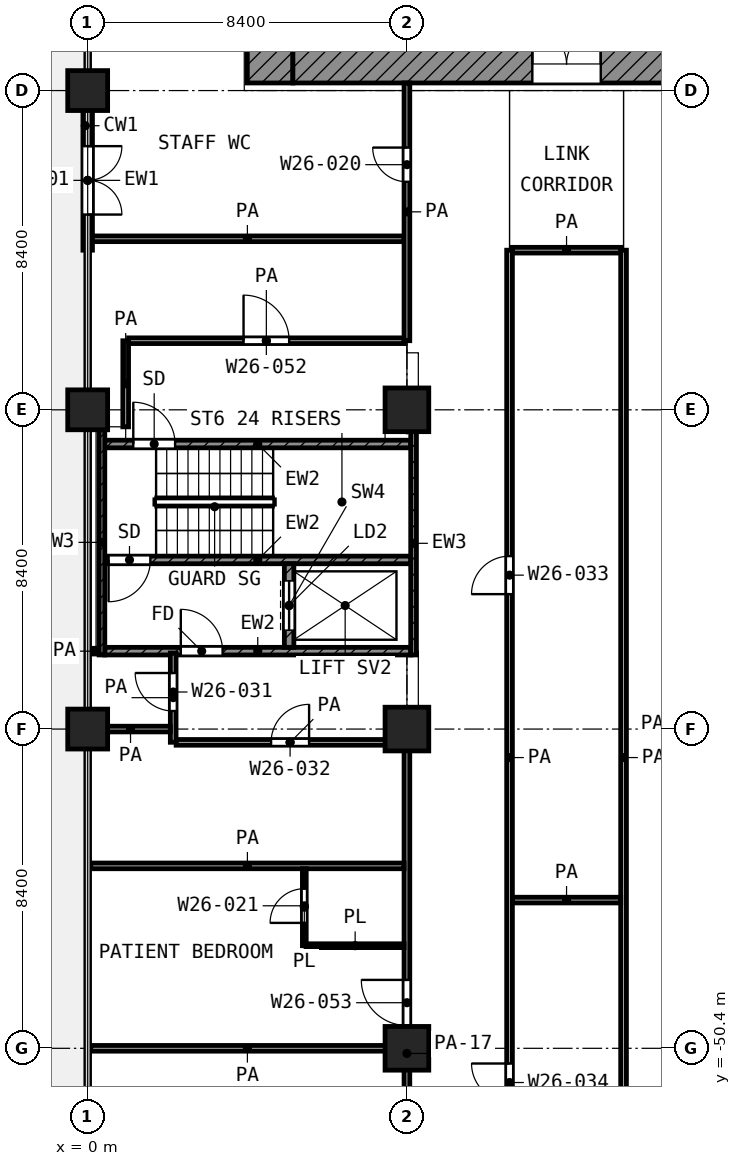
"""IFC4 building model, lengths in metres.
Left out: names, types, materials, properties, quantities, classifications, styles, units other than length and angle.
Written with IfcOpenShell. Run it as: python <this file> out.ifc"""

import sys

from ifc_helpers import new_model, si_unit, direction, frame, frame_2d, origin, origin_2d, place, context, subcontext, project, spatial, rectangle, extrude, element, fill, save


model = new_model("IFC4")
c1 = context("Model", 3, precision=1e-05, world=origin(), true_north=direction((0.0, 1.0)))
c2 = subcontext(c1, "Body", "Model", "MODEL_VIEW")
j1 = project(units=[si_unit("LENGTHUNIT", "METRE"), si_unit("PLANEANGLEUNIT", "RADIAN")], contexts=[c1])
p1 = place(None, origin())
s1 = spatial("IfcSite", under=j1, at=p1, CompositionType="ELEMENT")
p2 = place(p1, origin())
s2 = spatial("IfcBuilding", under=s1, at=p2, CompositionType="ELEMENT")
p3 = place(p2, frame((0.0, 0.0, 115.6)))
s3 = spatial("IfcBuildingStorey", under=s2, at=p3, CompositionType="ELEMENT", Elevation=115.6)
for number, where, z_axis, x_axis in (
    (1, (0.0, -25.2, 0.0), (0.0, 0.0, 1.0), (1.0, 0.0, 0.0)),
    (2, (0.0, -33.6, 0.0), (0.0, 0.0, 1.0), (1.0, 0.0, 0.0)),
):
    element("IfcColumn", number, at=place(p3, frame(where, z_axis=z_axis, x_axis=x_axis)), inside=s3, PredefinedType="COLUMN", context=c2, shape_type="SweptSolid", body=[
        extrude(rectangle(XDim=1.05, YDim=1.05, at=origin_2d()), origin(), (0.0, 0.0, 1.0), 4.2),
    ])
p4 = place(p3, frame((8.4, -33.6, 0.0), z_axis=(0.0, 0.0, 1.0), x_axis=(1.0, 0.0, 0.0)))
e3 = element("IfcColumn", 3, at=p4, inside=s3, PredefinedType="COLUMN", context=c2, shape_type="SweptSolid", body=[
    extrude(rectangle(XDim=1.15, YDim=1.15, at=origin_2d()), origin(), (0.0, 0.0, 1.0), 4.2),
])
p5 = place(p3, frame((0.0, -42.0, 0.0), z_axis=(0.0, 0.0, 1.0), x_axis=(1.0, 0.0, 0.0)))
e4 = element("IfcColumn", 4, at=p5, inside=s3, PredefinedType="COLUMN", context=c2, shape_type="SweptSolid", body=[
    extrude(rectangle(XDim=1.05, YDim=1.05, at=origin_2d()), origin(), (0.0, 0.0, 1.0), 4.2),
])
for number, where, z_axis, x_axis in (
    (5, (8.4, -42.0, 0.0), (0.0, 0.0, 1.0), (1.0, 0.0, 0.0)),
    (6, (8.4, -50.4, 0.0), (0.0, 0.0, 1.0), (1.0, 0.0, 0.0)),
):
    element("IfcColumn", number, at=place(p3, frame(where, z_axis=z_axis, x_axis=x_axis)), inside=s3, PredefinedType="COLUMN", context=c2, shape_type="SweptSolid", body=[
        extrude(rectangle(XDim=1.15, YDim=1.15, at=origin_2d()), origin(), (0.0, 0.0, 1.0), 4.2),
    ])
p6 = place(p3, frame((0.0, -25.725, 0.0), z_axis=(0.0, 0.0, 1.0), x_axis=(0.0, -1.0, 0.0)))
e7 = element("IfcWall", 7, at=p6, inside=s3, PredefinedType="SOLIDWALL", context=c2, shape_type="SweptSolid", body=[
    extrude(rectangle(XDim=3.675, YDim=0.25, at=frame_2d((1.837, 0.0))), origin(), (0.0, 0.0, 1.0), 3.48),
])
p7 = place(p6, frame((0.938, 0.0, 0.0)))
e8 = element("IfcOpeningElement", 8, at=p7, cuts=e7, PredefinedType="OPENING", context=c2, shape_type="SweptSolid", body=[
    extrude(rectangle(XDim=1.8, YDim=2.1, at=frame_2d((0.9, 1.05))), frame((0.0, 0.135, 0.0), z_axis=(0.0, -1.0, 0.0), x_axis=(1.0, 0.0, 0.0)), (0.0, 0.0, 1.0), 0.27),
])
p8 = place(p3, frame((4.8, -25.0, 0.0), z_axis=(0.0, 0.0, 1.0), x_axis=(0.0, 1.0, 0.0)))
e9 = element("IfcWall", 9, at=p8, inside=s3, PredefinedType="SHEAR", context=c2, shape_type="SweptSolid", body=[
    extrude(rectangle(XDim=19.6, YDim=1.2, at=frame_2d((9.8, 0.0))), origin(), (0.0, 0.0, 1.0), 3.6),
])
p9 = place(p8, frame((11.45, 0.0, 0.0)))
e10 = element("IfcOpeningElement", 10, at=p9, cuts=e9, PredefinedType="OPENING", context=c2, shape_type="SweptSolid", body=[
    extrude(rectangle(XDim=1.1, YDim=2.1, at=frame_2d((0.55, 1.05))), frame((0.0, 0.61, 0.0), z_axis=(0.0, -1.0, 0.0), x_axis=(1.0, 0.0, 0.0)), (0.0, 0.0, 1.0), 1.22),
])
p10 = place(p8, frame((2.15, 0.0, 0.0)))
e11 = element("IfcOpeningElement", 11, at=p10, cuts=e9, PredefinedType="OPENING", context=c2, shape_type="SweptSolid", body=[
    extrude(rectangle(XDim=1.1, YDim=2.1, at=frame_2d((0.55, 1.05))), frame((0.0, 0.61, 0.0), z_axis=(0.0, -1.0, 0.0), x_axis=(1.0, 0.0, 0.0)), (0.0, 0.0, 1.0), 1.22),
])
p11 = place(p3, frame((5.4, -24.5, 0.0), z_axis=(0.0, 0.0, 1.0), x_axis=(1.0, 0.0, 0.0)))
e12 = element("IfcWall", 12, at=p11, inside=s3, PredefinedType="SHEAR", context=c2, shape_type="SweptSolid", body=[
    extrude(rectangle(XDim=18.6, YDim=1.0, at=frame_2d((9.3, 0.0))), origin(), (0.0, 0.0, 1.0), 3.6),
])
p12 = place(p11, frame((6.3, 0.0, 0.0)))
e13 = element("IfcOpeningElement", 13, at=p12, cuts=e12, PredefinedType="OPENING", context=c2, shape_type="SweptSolid", body=[
    extrude(rectangle(XDim=1.8, YDim=2.1, at=frame_2d((0.9, 1.05))), frame((0.0, 0.51, 0.0), z_axis=(0.0, -1.0, 0.0), x_axis=(1.0, 0.0, 0.0)), (0.0, 0.0, 1.0), 1.02),
])
p13 = place(p3, frame((0.375, -40.05, 0.0), z_axis=(0.0, 0.0, 1.0), x_axis=(0.0, 1.0, 0.0)))
e14 = element("IfcWall", 14, at=p13, inside=s3, PredefinedType="SHEAR", context=c2, shape_type="SweptSolid", body=[
    extrude(rectangle(XDim=5.925, YDim=0.15, at=frame_2d((2.962, 0.0))), origin(), (0.0, 0.0, 1.0), 3.6),
])
p14 = place(p3, frame((8.575, -40.05, 0.0), z_axis=(0.0, 0.0, 1.0), x_axis=(0.0, 1.0, 0.0)))
e15 = element("IfcWall", 15, at=p14, inside=s3, PredefinedType="SHEAR", context=c2, shape_type="SweptSolid", body=[
    extrude(rectangle(XDim=5.875, YDim=0.15, at=frame_2d((2.938, 0.0))), origin(), (0.0, 0.0, 1.0), 3.6),
])
p15 = place(p3, frame((0.45, -34.5, 0.0), z_axis=(0.0, 0.0, 1.0), x_axis=(1.0, 0.0, 0.0)))
e16 = element("IfcWall", 16, at=p15, inside=s3, PredefinedType="SHEAR", context=c2, shape_type="SweptSolid", body=[
    extrude(rectangle(XDim=8.05, YDim=0.2, at=frame_2d((4.025, 0.0))), origin(), (0.0, 0.0, 1.0), 3.6),
])
p16 = place(p15, frame((0.75, 0.0, 0.0)))
e17 = element("IfcOpeningElement", 17, at=p16, cuts=e16, PredefinedType="OPENING", context=c2, shape_type="SweptSolid", body=[
    extrude(rectangle(XDim=1.1, YDim=2.1, at=frame_2d((0.55, 1.05))), frame((0.0, 0.11, 0.0), z_axis=(0.0, -1.0, 0.0), x_axis=(1.0, 0.0, 0.0)), (0.0, 0.0, 1.0), 0.22),
])
p17 = place(p3, frame((0.45, -37.55, 0.0), z_axis=(0.0, 0.0, 1.0), x_axis=(1.0, 0.0, 0.0)))
e18 = element("IfcWall", 18, at=p17, inside=s3, PredefinedType="SHEAR", context=c2, shape_type="SweptSolid", body=[
    extrude(rectangle(XDim=8.05, YDim=0.2, at=frame_2d((4.025, 0.0))), origin(), (0.0, 0.0, 1.0), 3.6),
])
p18 = place(p17, frame((0.1, 0.0, 0.0)))
e19 = element("IfcOpeningElement", 19, at=p18, cuts=e18, PredefinedType="OPENING", context=c2, shape_type="SweptSolid", body=[
    extrude(rectangle(XDim=1.1, YDim=2.1, at=frame_2d((0.55, 1.05))), frame((0.0, 0.11, 0.0), z_axis=(0.0, -1.0, 0.0), x_axis=(1.0, 0.0, 0.0)), (0.0, 0.0, 1.0), 0.22),
])
p19 = place(p3, frame((0.45, -39.95, 0.0), z_axis=(0.0, 0.0, 1.0), x_axis=(1.0, 0.0, 0.0)))
e20 = element("IfcWall", 20, at=p19, inside=s3, PredefinedType="SHEAR", context=c2, shape_type="SweptSolid", body=[
    extrude(rectangle(XDim=8.05, YDim=0.2, at=frame_2d((4.025, 0.0))), origin(), (0.0, 0.0, 1.0), 3.6),
])
p20 = place(p19, frame((2.0, 0.0, 0.0)))
e21 = element("IfcOpeningElement", 21, at=p20, cuts=e20, PredefinedType="OPENING", context=c2, shape_type="SweptSolid", body=[
    extrude(rectangle(XDim=1.1, YDim=2.1, at=frame_2d((0.55, 1.05))), frame((0.0, 0.11, 0.0), z_axis=(0.0, -1.0, 0.0), x_axis=(1.0, 0.0, 0.0)), (0.0, 0.0, 1.0), 0.22),
])
p21 = place(p3, frame((5.3, -39.85, 0.0), z_axis=(0.0, 0.0, 1.0), x_axis=(0.0, 1.0, 0.0)))
e22 = element("IfcWall", 22, at=p21, inside=s3, PredefinedType="SHEAR", context=c2, shape_type="SweptSolid", body=[
    extrude(rectangle(XDim=2.2, YDim=0.25, at=frame_2d((1.1, 0.0))), origin(), (0.0, 0.0, 1.0), 3.6),
])
p22 = place(p21, frame((0.45, 0.0, 0.0)))
e23 = element("IfcOpeningElement", 23, at=p22, cuts=e22, PredefinedType="OPENING", context=c2, shape_type="SweptSolid", body=[
    extrude(rectangle(XDim=1.3, YDim=2.1, at=frame_2d((0.65, 1.05))), frame((0.0, 0.135, 0.0), z_axis=(0.0, -1.0, 0.0), x_axis=(1.0, 0.0, 0.0)), (0.0, 0.0, 1.0), 0.27),
])
p23 = place(p3, frame((5.75, -47.7, 0.0), z_axis=(0.0, 0.0, 1.0), x_axis=(1.0, 0.0, 0.0)))
e24 = element("IfcWall", 24, at=p23, inside=s3, PredefinedType="PARTITIONING", context=c2, shape_type="SweptSolid", body=[
    extrude(rectangle(XDim=2.575, YDim=0.1, at=frame_2d((1.288, 0.0))), origin(), (0.0, 0.0, 1.0), 3.6),
])
p24 = place(p3, frame((5.7, -47.7, 0.0), z_axis=(0.0, 0.0, 1.0), x_axis=(0.0, 1.0, 0.0)))
e25 = element("IfcWall", 25, at=p24, inside=s3, PredefinedType="PARTITIONING", context=c2, shape_type="SweptSolid", body=[
    extrude(rectangle(XDim=2.025, YDim=0.1, at=frame_2d((1.012, 0.0))), origin(), (0.0, 0.0, 1.0), 3.6),
])
p25 = place(p24, frame((0.6, 0.0, 0.0)))
e26 = element("IfcOpeningElement", 26, at=p25, cuts=e25, PredefinedType="OPENING", context=c2, shape_type="SweptSolid", body=[
    extrude(rectangle(XDim=0.9, YDim=2.1, at=frame_2d((0.45, 1.05))), frame((0.0, 0.06, 0.0), z_axis=(0.0, -1.0, 0.0), x_axis=(1.0, 0.0, 0.0)), (0.0, 0.0, 1.0), 0.12),
])
p26 = place(p3, frame((0.08, -50.4, 0.0), z_axis=(0.0, 0.0, 1.0), x_axis=(1.0, 0.0, 0.0)))
e27 = element("IfcWall", 27, at=p26, inside=s3, PredefinedType="PARTITIONING", context=c2, shape_type="SweptSolid", body=[
    extrude(rectangle(XDim=8.245, YDim=0.15, at=frame_2d((4.123, 0.0))), origin(), (0.0, 0.0, 1.0), 3.6),
])
p27 = place(p3, frame((11.175, -46.5, 0.0), z_axis=(0.0, 0.0, 1.0), x_axis=(1.0, 0.0, 0.0)))
e28 = element("IfcWall", 28, at=p27, inside=s3, PredefinedType="PARTITIONING", context=c2, shape_type="SweptSolid", body=[
    extrude(rectangle(XDim=2.85, YDim=0.15, at=frame_2d((1.425, 0.0))), origin(), (0.0, 0.0, 1.0), 3.6),
])
p28 = place(p3, frame((0.08, -45.6, 0.0), z_axis=(0.0, 0.0, 1.0), x_axis=(1.0, 0.0, 0.0)))
e29 = element("IfcWall", 29, at=p28, inside=s3, PredefinedType="PARTITIONING", context=c2, shape_type="SweptSolid", body=[
    extrude(rectangle(XDim=8.245, YDim=0.15, at=frame_2d((4.123, 0.0))), origin(), (0.0, 0.0, 1.0), 3.6),
])
p29 = place(p3, frame((2.327, -42.35, 0.0), z_axis=(0.0, 0.0, 1.0), x_axis=(1.0, 0.0, 0.0)))
e30 = element("IfcWall", 30, at=p29, inside=s3, PredefinedType="PARTITIONING", context=c2, shape_type="SweptSolid", body=[
    extrude(rectangle(XDim=5.998, YDim=0.15, at=frame_2d((2.999, 0.0))), origin(), (0.0, 0.0, 1.0), 3.6),
])
p30 = place(p29, frame((2.499, 0.0, 0.0)))
e31 = element("IfcOpeningElement", 31, at=p30, cuts=e30, PredefinedType="OPENING", context=c2, shape_type="SweptSolid", body=[
    extrude(rectangle(XDim=1.0, YDim=2.1, at=frame_2d((0.5, 1.05))), frame((0.0, 0.085, 0.0), z_axis=(0.0, -1.0, 0.0), x_axis=(1.0, 0.0, 0.0)), (0.0, 0.0, 1.0), 0.17),
])
p31 = place(p3, frame((0.08, -42.0, 0.0), z_axis=(0.0, 0.0, 1.0), x_axis=(1.0, 0.0, 0.0)))
e32 = element("IfcWall", 32, at=p31, inside=s3, PredefinedType="PARTITIONING", context=c2, shape_type="SweptSolid", body=[
    extrude(rectangle(XDim=2.095, YDim=0.15, at=frame_2d((1.047, 0.0))), origin(), (0.0, 0.0, 1.0), 3.6),
])
p32 = place(p3, frame((0.08, -39.95, 0.0), z_axis=(0.0, 0.0, 1.0), x_axis=(1.0, 0.0, 0.0)))
e33 = element("IfcWall", 33, at=p32, inside=s3, PredefinedType="PARTITIONING", context=c2, shape_type="SweptSolid", body=[
    extrude(rectangle(XDim=0.19, YDim=0.15, at=frame_2d((0.095, 0.0))), origin(), (0.0, 0.0, 1.0), 3.6),
])
p33 = place(p3, frame((1.077, -31.782, 0.0), z_axis=(0.0, 0.0, 1.0), x_axis=(1.0, 0.0, 0.0)))
e34 = element("IfcWall", 34, at=p33, inside=s3, PredefinedType="PARTITIONING", context=c2, shape_type="SweptSolid", body=[
    extrude(rectangle(XDim=7.248, YDim=0.15, at=frame_2d((3.624, 0.0))), origin(), (0.0, 0.0, 1.0), 3.6),
])
p34 = place(p33, frame((3.024, 0.0, 0.0)))
e35 = element("IfcOpeningElement", 35, at=p34, cuts=e34, PredefinedType="OPENING", context=c2, shape_type="SweptSolid", body=[
    extrude(rectangle(XDim=1.2, YDim=2.1, at=frame_2d((0.6, 1.05))), frame((0.0, 0.085, 0.0), z_axis=(0.0, -1.0, 0.0), x_axis=(1.0, 0.0, 0.0)), (0.0, 0.0, 1.0), 0.17),
])
p35 = place(p3, frame((11.175, -29.4, 0.0), z_axis=(0.0, 0.0, 1.0), x_axis=(1.0, 0.0, 0.0)))
e36 = element("IfcWall", 36, at=p35, inside=s3, PredefinedType="PARTITIONING", context=c2, shape_type="SweptSolid", body=[
    extrude(rectangle(XDim=2.85, YDim=0.15, at=frame_2d((1.425, 0.0))), origin(), (0.0, 0.0, 1.0), 3.6),
])
p36 = place(p3, frame((0.08, -29.1, 0.0), z_axis=(0.0, 0.0, 1.0), x_axis=(1.0, 0.0, 0.0)))
e37 = element("IfcWall", 37, at=p36, inside=s3, PredefinedType="PARTITIONING", context=c2, shape_type="SweptSolid", body=[
    extrude(rectangle(XDim=8.245, YDim=0.15, at=frame_2d((4.123, 0.0))), origin(), (0.0, 0.0, 1.0), 3.6),
])
p37 = place(p3, frame((1.0, -34.048, 0.0), z_axis=(0.0, 0.0, 1.0), x_axis=(0.0, 1.0, 0.0)))
e38 = element("IfcWall", 38, at=p37, inside=s3, PredefinedType="PARTITIONING", context=c2, shape_type="SweptSolid", body=[
    extrude(rectangle(XDim=2.265, YDim=0.15, at=frame_2d((1.133, 0.0))), origin(), (0.0, 0.0, 1.0), 3.6),
])
p38 = place(p3, frame((2.25, -42.348, 0.0), z_axis=(0.0, 0.0, 1.0), x_axis=(0.0, 1.0, 0.0)))
e39 = element("IfcWall", 39, at=p38, inside=s3, PredefinedType="PARTITIONING", context=c2, shape_type="SweptSolid", body=[
    extrude(rectangle(XDim=2.348, YDim=0.15, at=frame_2d((1.174, 0.0))), origin(), (0.0, 0.0, 1.0), 3.6),
])
p39 = place(p38, frame((0.823, 0.0, 0.0)))
e40 = element("IfcOpeningElement", 40, at=p39, cuts=e39, PredefinedType="OPENING", context=c2, shape_type="SweptSolid", body=[
    extrude(rectangle(XDim=1.0, YDim=2.1, at=frame_2d((0.5, 1.05))), frame((0.0, 0.085, 0.0), z_axis=(0.0, -1.0, 0.0), x_axis=(1.0, 0.0, 0.0)), (0.0, 0.0, 1.0), 0.17),
])
p40 = place(p3, frame((8.4, -58.72, 0.0), z_axis=(0.0, 0.0, 1.0), x_axis=(0.0, 1.0, 0.0)))
e41 = element("IfcWall", 41, at=p40, inside=s3, PredefinedType="PARTITIONING", context=c2, shape_type="SweptSolid", body=[
    extrude(rectangle(XDim=16.37, YDim=0.15, at=frame_2d((8.185, 0.0))), origin(), (0.0, 0.0, 1.0), 2.7),
])
p41 = place(p40, frame((8.92, 0.0, 0.0)))
e42 = element("IfcOpeningElement", 42, at=p41, cuts=e41, PredefinedType="OPENING", context=c2, shape_type="SweptSolid", body=[
    extrude(rectangle(XDim=1.2, YDim=2.1, at=frame_2d((0.6, 1.05))), frame((0.0, 0.085, 0.0), z_axis=(0.0, -1.0, 0.0), x_axis=(1.0, 0.0, 0.0)), (0.0, 0.0, 1.0), 0.17),
])
p42 = place(p40, frame((3.37, 0.0, 0.0)))
e43 = element("IfcOpeningElement", 43, at=p42, cuts=e41, PredefinedType="OPENING", context=c2, shape_type="SweptSolid", body=[
    extrude(rectangle(XDim=1.5, YDim=2.1, at=frame_2d((0.75, 1.05))), frame((0.0, 0.085, 0.0), z_axis=(0.0, -1.0, 0.0), x_axis=(1.0, 0.0, 0.0)), (0.0, 0.0, 1.0), 0.17),
])
p43 = place(p3, frame((8.4, -31.782, 0.0), z_axis=(0.0, 0.0, 1.0), x_axis=(0.0, 1.0, 0.0)))
e44 = element("IfcWall", 44, at=p43, inside=s3, PredefinedType="PARTITIONING", context=c2, shape_type="SweptSolid", body=[
    extrude(rectangle(XDim=6.782, YDim=0.15, at=frame_2d((3.391, 0.0))), origin(), (0.0, 0.0, 1.0), 3.6),
])
p44 = place(p43, frame((4.182, 0.0, 0.0)))
e45 = element("IfcOpeningElement", 45, at=p44, cuts=e44, PredefinedType="OPENING", context=c2, shape_type="SweptSolid", body=[
    extrude(rectangle(XDim=0.9, YDim=2.1, at=frame_2d((0.45, 1.05))), frame((0.0, 0.085, 0.0), z_axis=(0.0, -1.0, 0.0), x_axis=(1.0, 0.0, 0.0)), (0.0, 0.0, 1.0), 0.17),
])
p45 = place(p3, frame((11.1, -56.1, 0.0), z_axis=(0.0, 0.0, 1.0), x_axis=(0.0, 1.0, 0.0)))
e46 = element("IfcWall", 46, at=p45, inside=s3, PredefinedType="PARTITIONING", context=c2, shape_type="SweptSolid", body=[
    extrude(rectangle(XDim=26.7, YDim=0.15, at=frame_2d((13.35, 0.0))), origin(), (0.0, 0.0, 1.0), 3.6),
])
p46 = place(p45, frame((17.65, 0.0, 0.0)))
e47 = element("IfcOpeningElement", 47, at=p46, cuts=e46, PredefinedType="OPENING", context=c2, shape_type="SweptSolid", body=[
    extrude(rectangle(XDim=1.0, YDim=2.1, at=frame_2d((0.5, 1.05))), frame((0.0, 0.085, 0.0), z_axis=(0.0, -1.0, 0.0), x_axis=(1.0, 0.0, 0.0)), (0.0, 0.0, 1.0), 0.17),
])
p47 = place(p45, frame((4.3, 0.0, 0.0)))
e48 = element("IfcOpeningElement", 48, at=p47, cuts=e46, PredefinedType="OPENING", context=c2, shape_type="SweptSolid", body=[
    extrude(rectangle(XDim=1.0, YDim=2.1, at=frame_2d((0.5, 1.05))), frame((0.0, 0.085, 0.0), z_axis=(0.0, -1.0, 0.0), x_axis=(1.0, 0.0, 0.0)), (0.0, 0.0, 1.0), 0.17),
])
p48 = place(p3, frame((14.1, -56.1, 0.0), z_axis=(0.0, 0.0, 1.0), x_axis=(0.0, 1.0, 0.0)))
e49 = element("IfcWall", 49, at=p48, inside=s3, PredefinedType="PARTITIONING", context=c2, shape_type="SweptSolid", body=[
    extrude(rectangle(XDim=26.7, YDim=0.15, at=frame_2d((13.35, 0.0))), origin(), (0.0, 0.0, 1.0), 3.6),
])
p49 = place(p7, origin())
e50 = element("IfcDoor", 50, at=p49, inside=s3, OperationType="DOUBLE_DOOR_SINGLE_SWING", PredefinedType="DOOR", context=c2, shape_type="SweptSolid", body=[
    extrude(rectangle(XDim=1.8, YDim=2.1, at=frame_2d((0.9, 1.05))), frame((0.0, 0.025, 0.0), z_axis=(0.0, -1.0, 0.0), x_axis=(1.0, 0.0, 0.0)), (0.0, 0.0, 1.0), 0.05),
])
fill(e8, e50)
p50 = place(p12, origin())
e51 = element("IfcDoor", 51, at=p50, inside=s3, OperationType="DOUBLE_DOOR_SINGLE_SWING", PredefinedType="DOOR", context=c2, shape_type="SweptSolid", body=[
    extrude(rectangle(XDim=1.8, YDim=2.1, at=frame_2d((0.9, 1.05))), frame((0.0, 0.025, 0.0), z_axis=(0.0, -1.0, 0.0), x_axis=(1.0, 0.0, 0.0)), (0.0, 0.0, 1.0), 0.05),
])
fill(e13, e51)
p51 = place(p16, origin())
e52 = element("IfcDoor", 52, at=p51, inside=s3, OperationType="SINGLE_SWING_LEFT", PredefinedType="DOOR", context=c2, shape_type="SweptSolid", body=[
    extrude(rectangle(XDim=1.1, YDim=2.1, at=frame_2d((0.55, 1.05))), frame((0.0, 0.025, 0.0), z_axis=(0.0, -1.0, 0.0), x_axis=(1.0, 0.0, 0.0)), (0.0, 0.0, 1.0), 0.05),
])
fill(e17, e52)
p52 = place(p18, frame((1.1, 0.0, 0.0), z_axis=(0.0, 0.0, 1.0), x_axis=(-1.0, 0.0, 0.0)))
e53 = element("IfcDoor", 53, at=p52, inside=s3, OperationType="SINGLE_SWING_LEFT", PredefinedType="DOOR", context=c2, shape_type="SweptSolid", body=[
    extrude(rectangle(XDim=1.1, YDim=2.1, at=frame_2d((0.55, 1.05))), frame((0.0, 0.025, 0.0), z_axis=(0.0, -1.0, 0.0), x_axis=(1.0, 0.0, 0.0)), (0.0, 0.0, 1.0), 0.05),
])
fill(e19, e53)
p53 = place(p22, origin())
e54 = element("IfcDoor", 54, at=p53, inside=s3, OperationType="DOUBLE_DOOR_SLIDING", PredefinedType="DOOR", context=c2, shape_type="SweptSolid", body=[
    extrude(rectangle(XDim=1.3, YDim=2.1, at=frame_2d((0.65, 1.05))), frame((0.0, 0.025, 0.0), z_axis=(0.0, -1.0, 0.0), x_axis=(1.0, 0.0, 0.0)), (0.0, 0.0, 1.0), 0.05),
])
fill(e23, e54)
p54 = place(p20, origin())
e55 = element("IfcDoor", 55, at=p54, inside=s3, OperationType="SINGLE_SWING_LEFT", PredefinedType="DOOR", context=c2, shape_type="SweptSolid", body=[
    extrude(rectangle(XDim=1.1, YDim=2.1, at=frame_2d((0.55, 1.05))), frame((0.0, 0.025, 0.0), z_axis=(0.0, -1.0, 0.0), x_axis=(1.0, 0.0, 0.0)), (0.0, 0.0, 1.0), 0.05),
])
fill(e21, e55)
p55 = place(p44, origin())
e56 = element("IfcDoor", 56, at=p55, inside=s3, OperationType="SINGLE_SWING_RIGHT", PredefinedType="DOOR", context=c2, shape_type="SweptSolid", body=[
    extrude(rectangle(XDim=0.9, YDim=2.1, at=frame_2d((0.45, 1.05))), frame((0.0, 0.025, 0.0), z_axis=(0.0, -1.0, 0.0), x_axis=(1.0, 0.0, 0.0)), (0.0, 0.0, 1.0), 0.05),
])
fill(e45, e56)
p56 = place(p34, origin())
e57 = element("IfcDoor", 57, at=p56, inside=s3, OperationType="SINGLE_SWING_LEFT", PredefinedType="DOOR", context=c2, shape_type="SweptSolid", body=[
    extrude(rectangle(XDim=1.2, YDim=2.1, at=frame_2d((0.6, 1.05))), frame((0.0, 0.025, 0.0), z_axis=(0.0, -1.0, 0.0), x_axis=(1.0, 0.0, 0.0)), (0.0, 0.0, 1.0), 0.05),
])
fill(e35, e57)
p57 = place(p39, origin())
e58 = element("IfcDoor", 58, at=p57, inside=s3, OperationType="SINGLE_SWING_RIGHT", PredefinedType="DOOR", context=c2, shape_type="SweptSolid", body=[
    extrude(rectangle(XDim=1.0, YDim=2.1, at=frame_2d((0.5, 1.05))), frame((0.0, 0.025, 0.0), z_axis=(0.0, -1.0, 0.0), x_axis=(1.0, 0.0, 0.0)), (0.0, 0.0, 1.0), 0.05),
])
fill(e40, e58)
p58 = place(p30, origin())
e59 = element("IfcDoor", 59, at=p58, inside=s3, OperationType="SINGLE_SWING_RIGHT", PredefinedType="DOOR", context=c2, shape_type="SweptSolid", body=[
    extrude(rectangle(XDim=1.0, YDim=2.1, at=frame_2d((0.5, 1.05))), frame((0.0, 0.025, 0.0), z_axis=(0.0, -1.0, 0.0), x_axis=(1.0, 0.0, 0.0)), (0.0, 0.0, 1.0), 0.05),
])
fill(e31, e59)
p59 = place(p41, origin())
e60 = element("IfcDoor", 60, at=p59, inside=s3, OperationType="SINGLE_SWING_RIGHT", PredefinedType="DOOR", context=c2, shape_type="SweptSolid", body=[
    extrude(rectangle(XDim=1.2, YDim=2.1, at=frame_2d((0.6, 1.05))), frame((0.0, 0.025, 0.0), z_axis=(0.0, -1.0, 0.0), x_axis=(1.0, 0.0, 0.0)), (0.0, 0.0, 1.0), 0.05),
])
fill(e42, e60)
p60 = place(p25, origin())
e61 = element("IfcDoor", 61, at=p60, inside=s3, OperationType="SINGLE_SWING_LEFT", PredefinedType="DOOR", context=c2, shape_type="SweptSolid", body=[
    extrude(rectangle(XDim=0.9, YDim=2.1, at=frame_2d((0.45, 1.05))), frame((0.0, 0.025, 0.0), z_axis=(0.0, -1.0, 0.0), x_axis=(1.0, 0.0, 0.0)), (0.0, 0.0, 1.0), 0.05),
])
fill(e26, e61)
p61 = place(p46, origin())
e62 = element("IfcDoor", 62, at=p61, inside=s3, OperationType="SINGLE_SWING_LEFT", PredefinedType="DOOR", context=c2, shape_type="SweptSolid", body=[
    extrude(rectangle(XDim=1.0, YDim=2.1, at=frame_2d((0.5, 1.05))), frame((0.0, 0.025, 0.0), z_axis=(0.0, -1.0, 0.0), x_axis=(1.0, 0.0, 0.0)), (0.0, 0.0, 1.0), 0.05),
])
fill(e47, e62)
p62 = place(p47, origin())
e63 = element("IfcDoor", 63, at=p62, inside=s3, OperationType="SINGLE_SWING_RIGHT", PredefinedType="DOOR", context=c2, shape_type="SweptSolid", body=[
    extrude(rectangle(XDim=1.0, YDim=2.1, at=frame_2d((0.5, 1.05))), frame((0.0, 0.025, 0.0), z_axis=(0.0, -1.0, 0.0), x_axis=(1.0, 0.0, 0.0)), (0.0, 0.0, 1.0), 0.05),
])
fill(e48, e63)
save(model, sys.argv[1])
